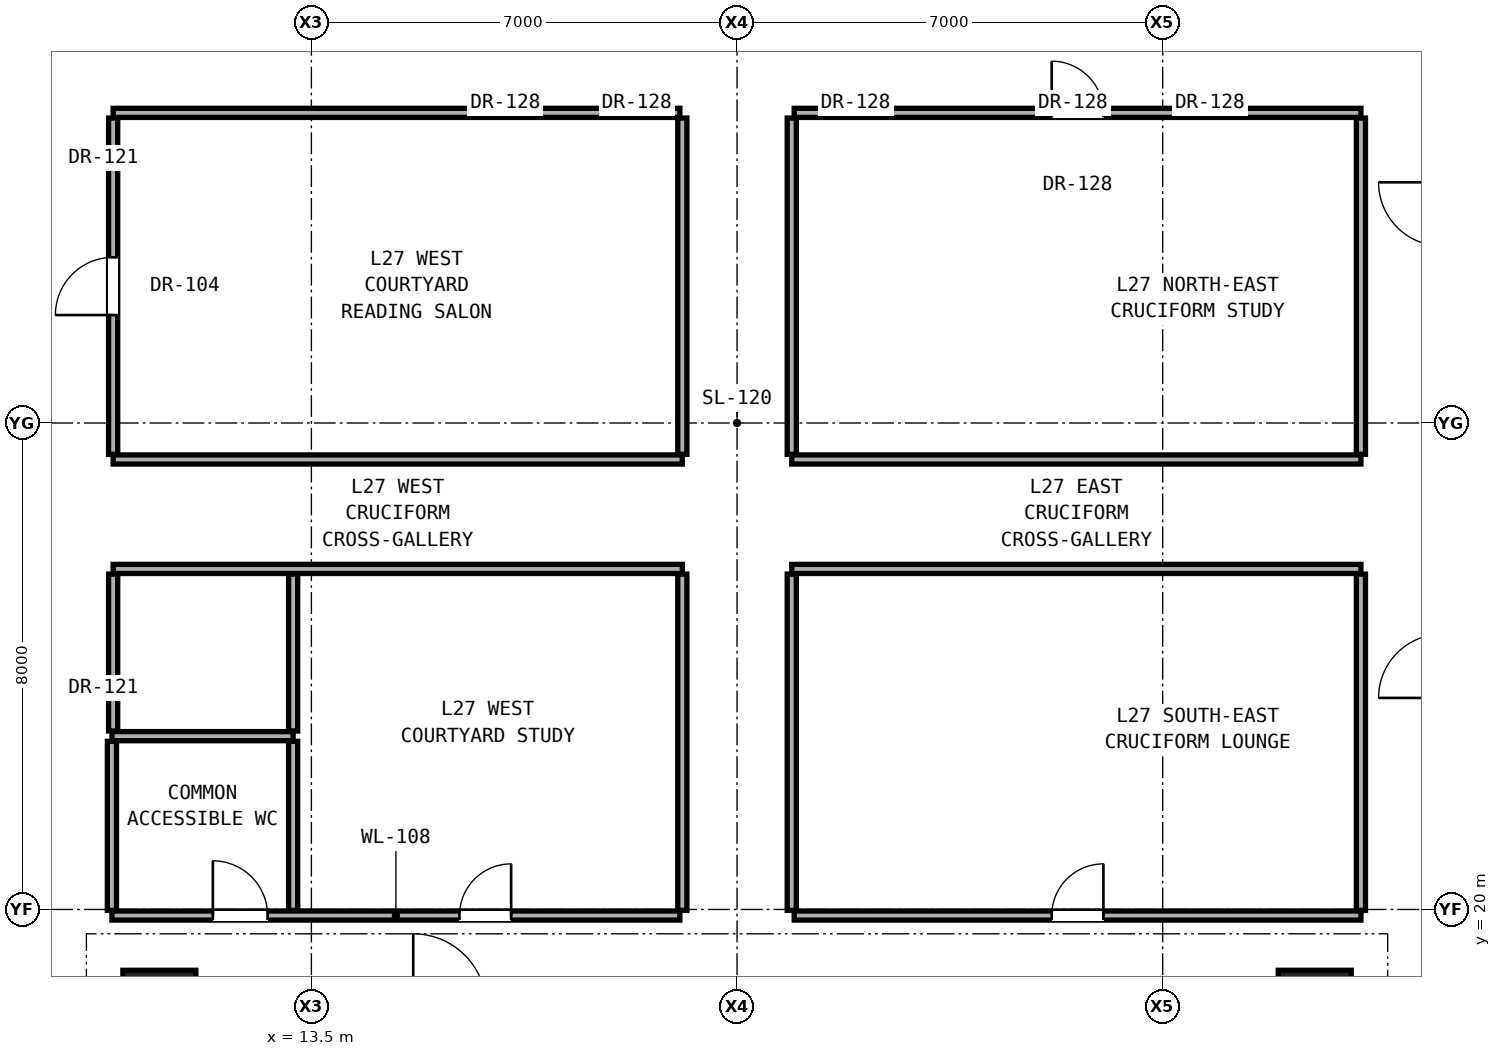
"""IFC4 building model, lengths in metres.
Left out: names, types, materials, properties, quantities, classifications, styles, units other than length and angle.
Written with IfcOpenShell. Run it as: python <this file> out.ifc"""

import sys

from ifc_helpers import new_model, si_unit, direction, frame, frame_2d, origin, origin_2d, place, context, subcontext, project, spatial, rectangle, extrude, element, fill, save


model = new_model("IFC4")
c1 = context("Model", 3, precision=1e-05, world=origin(), true_north=direction((0.0, 1.0)))
c2 = subcontext(c1, "Body", "Model", "MODEL_VIEW")
j1 = project(units=[si_unit("LENGTHUNIT", "METRE"), si_unit("PLANEANGLEUNIT", "RADIAN")], contexts=[c1])
p1 = place(None, origin())
s1 = spatial("IfcSite", under=j1, at=p1, CompositionType="ELEMENT")
p2 = place(p1, origin())
s2 = spatial("IfcBuilding", under=s1, at=p2, CompositionType="ELEMENT")
p3 = place(p2, frame((0.0, 0.0, 98.3)))
s3 = spatial("IfcBuildingStorey", under=s2, at=p3, CompositionType="ELEMENT", Elevation=98.3)
for number, where, z_axis, x_axis in (
    (1, (11.0, 18.4, 0.0), (0.0, 0.0, 1.0), (1.0, 0.0, 0.0)),
    (2, (30.0, 18.4, 0.0), (0.0, 0.0, 1.0), (1.0, 0.0, 0.0)),
):
    element("IfcColumn", number, at=place(p3, frame(where, z_axis=z_axis, x_axis=x_axis)), inside=s3, PredefinedType="COLUMN", context=c2, shape_type="SweptSolid", body=[
        extrude(rectangle(XDim=1.2, YDim=1.2, at=origin_2d()), origin(), (0.0, 0.0, 1.0), 3.3),
    ])
p4 = place(p3, frame((10.22, 19.9, 0.0), z_axis=(0.0, 0.0, 1.0), x_axis=(1.0, 0.0, 0.0)))
e3 = element("IfcWall", 3, at=p4, inside=s3, PredefinedType="PARTITIONING", context=c2, shape_type="SweptSolid", body=[
    extrude(rectangle(XDim=9.34, YDim=0.15, at=frame_2d((4.67, 0.0))), origin(), (0.0, 0.0, 1.0), 2.124),
])
p5 = place(p4, frame((1.66, 0.0, 0.0)))
e4 = element("IfcOpeningElement", 4, at=p5, cuts=e3, PredefinedType="OPENING", context=c2, shape_type="SweptSolid", body=[
    extrude(rectangle(XDim=0.9, YDim=2.1, at=frame_2d((0.45, 1.05))), frame((0.0, 0.085, 0.0), z_axis=(0.0, -1.0, 0.0), x_axis=(1.0, 0.0, 0.0)), (0.0, 0.0, 1.0), 0.17),
])
p6 = place(p4, frame((5.715, 0.0, 0.0)))
e5 = element("IfcOpeningElement", 5, at=p6, cuts=e3, PredefinedType="OPENING", context=c2, shape_type="SweptSolid", body=[
    extrude(rectangle(XDim=0.85, YDim=2.01, at=frame_2d((0.425, 1.005))), frame((0.0, 0.085, 0.0), z_axis=(0.0, -1.0, 0.0), x_axis=(1.0, 0.0, 0.0)), (0.0, 0.0, 1.0), 0.17),
])
p7 = place(p3, frame((21.44, 19.9, 0.0), z_axis=(0.0, 0.0, 1.0), x_axis=(1.0, 0.0, 0.0)))
e6 = element("IfcWall", 6, at=p7, inside=s3, PredefinedType="PARTITIONING", context=c2, shape_type="SweptSolid", body=[
    extrude(rectangle(XDim=9.32, YDim=0.15, at=frame_2d((4.66, 0.0))), origin(), (0.0, 0.0, 1.0), 2.124),
])
p8 = place(p7, frame((4.235, 0.0, 0.0)))
e7 = element("IfcOpeningElement", 7, at=p8, cuts=e6, PredefinedType="OPENING", context=c2, shape_type="SweptSolid", body=[
    extrude(rectangle(XDim=0.85, YDim=2.01, at=frame_2d((0.425, 1.005))), frame((0.0, 0.085, 0.0), z_axis=(0.0, -1.0, 0.0), x_axis=(1.0, 0.0, 0.0)), (0.0, 0.0, 1.0), 0.17),
])
p9 = place(p3, frame((10.22, 22.85, 0.0), z_axis=(0.0, 0.0, 1.0), x_axis=(1.0, 0.0, 0.0)))
e8 = element("IfcWall", 8, at=p9, inside=s3, PredefinedType="PARTITIONING", context=c2, shape_type="SweptSolid", body=[
    extrude(rectangle(XDim=2.98, YDim=0.15, at=frame_2d((1.49, 0.0))), origin(), (0.0, 0.0, 1.0), 2.124),
])
for number, where, z_axis, x_axis in (
    (9, (10.24, 25.6, 0.0), (0.0, 0.0, 1.0), (1.0, 0.0, 0.0)),
    (10, (21.4, 25.6, 0.0), (0.0, 0.0, 1.0), (1.0, 0.0, 0.0)),
    (11, (10.24, 27.4, 0.0), (0.0, 0.0, 1.0), (1.0, 0.0, 0.0)),
    (12, (21.4, 27.4, 0.0), (0.0, 0.0, 1.0), (1.0, 0.0, 0.0)),
):
    element("IfcWall", number, at=place(p3, frame(where, z_axis=z_axis, x_axis=x_axis)), inside=s3, PredefinedType="PARTITIONING", context=c2, shape_type="SweptSolid", body=[
        extrude(rectangle(XDim=9.36, YDim=0.15, at=frame_2d((4.68, 0.0))), origin(), (0.0, 0.0, 1.0), 2.124),
    ])
p10 = place(p3, frame((10.24, 33.1, 0.0), z_axis=(0.0, 0.0, 1.0), x_axis=(1.0, 0.0, 0.0)))
e13 = element("IfcWall", 13, at=p10, inside=s3, PredefinedType="PARTITIONING", context=c2, shape_type="SweptSolid", body=[
    extrude(rectangle(XDim=9.32, YDim=0.15, at=frame_2d((4.66, 0.0))), origin(), (0.0, 0.0, 1.0), 2.124),
])
p11 = place(p3, frame((21.44, 33.1, 0.0), z_axis=(0.0, 0.0, 1.0), x_axis=(1.0, 0.0, 0.0)))
e14 = element("IfcWall", 14, at=p11, inside=s3, PredefinedType="PARTITIONING", context=c2, shape_type="SweptSolid", body=[
    extrude(rectangle(XDim=9.32, YDim=0.15, at=frame_2d((4.66, 0.0))), origin(), (0.0, 0.0, 1.0), 2.124),
])
p12 = place(p11, frame((4.235, 0.0, 0.0)))
e15 = element("IfcOpeningElement", 15, at=p12, cuts=e14, PredefinedType="OPENING", context=c2, shape_type="SweptSolid", body=[
    extrude(rectangle(XDim=0.85, YDim=2.01, at=frame_2d((0.425, 1.005))), frame((0.0, 0.085, 0.0), z_axis=(0.0, -1.0, 0.0), x_axis=(1.0, 0.0, 0.0)), (0.0, 0.0, 1.0), 0.17),
])
p13 = place(p3, frame((10.22, 19.985, 0.0), z_axis=(0.0, 0.0, 1.0), x_axis=(0.0, 1.0, 0.0)))
e16 = element("IfcWall", 16, at=p13, inside=s3, PredefinedType="PARTITIONING", context=c2, shape_type="SweptSolid", body=[
    extrude(rectangle(XDim=2.78, YDim=0.15, at=frame_2d((1.39, 0.0))), origin(), (0.0, 0.0, 1.0), 3.08),
])
p14 = place(p3, frame((10.24, 22.935, 0.0), z_axis=(0.0, 0.0, 1.0), x_axis=(0.0, 1.0, 0.0)))
e17 = element("IfcWall", 17, at=p14, inside=s3, PredefinedType="PARTITIONING", context=c2, shape_type="SweptSolid", body=[
    extrude(rectangle(XDim=2.58, YDim=0.15, at=frame_2d((1.29, 0.0))), origin(), (0.0, 0.0, 1.0), 2.299),
])
p15 = place(p3, frame((10.24, 27.485, 0.0), z_axis=(0.0, 0.0, 1.0), x_axis=(0.0, 1.0, 0.0)))
e18 = element("IfcWall", 18, at=p15, inside=s3, PredefinedType="PARTITIONING", context=c2, shape_type="SweptSolid", body=[
    extrude(rectangle(XDim=5.53, YDim=0.15, at=frame_2d((2.765, 0.0))), origin(), (0.0, 0.0, 1.0), 2.299),
])
p16 = place(p15, frame((2.29, 0.0, 0.0)))
e19 = element("IfcOpeningElement", 19, at=p16, cuts=e18, PredefinedType="OPENING", context=c2, shape_type="SweptSolid", body=[
    extrude(rectangle(XDim=0.95, YDim=2.15, at=frame_2d((0.475, 1.075))), frame((0.0, 0.085, 0.0), z_axis=(0.0, -1.0, 0.0), x_axis=(1.0, 0.0, 0.0)), (0.0, 0.0, 1.0), 0.17),
])
p17 = place(p3, frame((13.2, 19.985, 0.0), z_axis=(0.0, 0.0, 1.0), x_axis=(0.0, 1.0, 0.0)))
e20 = element("IfcWall", 20, at=p17, inside=s3, PredefinedType="PARTITIONING", context=c2, shape_type="SweptSolid", body=[
    extrude(rectangle(XDim=2.78, YDim=0.15, at=frame_2d((1.39, 0.0))), origin(), (0.0, 0.0, 1.0), 3.08),
])
p18 = place(p3, frame((13.2, 22.935, 0.0), z_axis=(0.0, 0.0, 1.0), x_axis=(0.0, 1.0, 0.0)))
e21 = element("IfcWall", 21, at=p18, inside=s3, PredefinedType="PARTITIONING", context=c2, shape_type="SweptSolid", body=[
    extrude(rectangle(XDim=2.58, YDim=0.15, at=frame_2d((1.29, 0.0))), origin(), (0.0, 0.0, 1.0), 2.124),
])
for number, where, z_axis, x_axis in (
    (22, (19.6, 19.985, 0.0), (0.0, 0.0, 1.0), (0.0, 1.0, 0.0)),
    (23, (19.6, 27.485, 0.0), (0.0, 0.0, 1.0), (0.0, 1.0, 0.0)),
    (24, (21.4, 19.985, 0.0), (0.0, 0.0, 1.0), (0.0, 1.0, 0.0)),
    (25, (21.4, 27.485, 0.0), (0.0, 0.0, 1.0), (0.0, 1.0, 0.0)),
):
    element("IfcWall", number, at=place(p3, frame(where, z_axis=z_axis, x_axis=x_axis)), inside=s3, PredefinedType="PARTITIONING", context=c2, shape_type="SweptSolid", body=[
        extrude(rectangle(XDim=5.53, YDim=0.15, at=frame_2d((2.765, 0.0))), origin(), (0.0, 0.0, 1.0), 2.124),
    ])
for number, where, z_axis, x_axis in (
    (26, (30.76, 19.985, 0.0), (0.0, 0.0, 1.0), (0.0, 1.0, 0.0)),
    (27, (30.76, 27.485, 0.0), (0.0, 0.0, 1.0), (0.0, 1.0, 0.0)),
):
    element("IfcWall", number, at=place(p3, frame(where, z_axis=z_axis, x_axis=x_axis)), inside=s3, PredefinedType="PARTITIONING", context=c2, shape_type="SweptSolid", body=[
        extrude(rectangle(XDim=5.53, YDim=0.15, at=frame_2d((2.765, 0.0))), origin(), (0.0, 0.0, 1.0), 2.299),
    ])
p19 = place(p5, origin())
e28 = element("IfcDoor", 28, at=p19, inside=s3, OperationType="SINGLE_SWING_LEFT", PredefinedType="DOOR", context=c2, shape_type="SweptSolid", body=[
    extrude(rectangle(XDim=0.9, YDim=2.1, at=frame_2d((0.45, 1.05))), frame((0.0, 0.025, 0.0), z_axis=(0.0, -1.0, 0.0), x_axis=(1.0, 0.0, 0.0)), (0.0, 0.0, 1.0), 0.05),
])
fill(e4, e28)
p20 = place(p6, origin())
e29 = element("IfcDoor", 29, at=p20, inside=s3, OperationType="SINGLE_SWING_RIGHT", PredefinedType="DOOR", context=c2, shape_type="SweptSolid", body=[
    extrude(rectangle(XDim=0.85, YDim=2.01, at=frame_2d((0.425, 1.005))), frame((0.0, 0.025, 0.0), z_axis=(0.0, -1.0, 0.0), x_axis=(1.0, 0.0, 0.0)), (0.0, 0.0, 1.0), 0.05),
])
fill(e5, e29)
p21 = place(p16, origin())
e30 = element("IfcDoor", 30, at=p21, inside=s3, OperationType="SINGLE_SWING_LEFT", PredefinedType="DOOR", context=c2, shape_type="SweptSolid", body=[
    extrude(rectangle(XDim=0.95, YDim=2.15, at=frame_2d((0.475, 1.075))), frame((0.0, 0.025, 0.0), z_axis=(0.0, -1.0, 0.0), x_axis=(1.0, 0.0, 0.0)), (0.0, 0.0, 1.0), 0.05),
])
fill(e19, e30)
p22 = place(p8, origin())
e31 = element("IfcDoor", 31, at=p22, inside=s3, OperationType="SINGLE_SWING_RIGHT", PredefinedType="DOOR", context=c2, shape_type="SweptSolid", body=[
    extrude(rectangle(XDim=0.85, YDim=2.01, at=frame_2d((0.425, 1.005))), frame((0.0, 0.025, 0.0), z_axis=(0.0, -1.0, 0.0), x_axis=(1.0, 0.0, 0.0)), (0.0, 0.0, 1.0), 0.05),
])
fill(e7, e31)
p23 = place(p12, origin())
e32 = element("IfcDoor", 32, at=p23, inside=s3, OperationType="SINGLE_SWING_LEFT", PredefinedType="DOOR", context=c2, shape_type="SweptSolid", body=[
    extrude(rectangle(XDim=0.85, YDim=2.01, at=frame_2d((0.425, 1.005))), frame((0.0, 0.025, 0.0), z_axis=(0.0, -1.0, 0.0), x_axis=(1.0, 0.0, 0.0)), (0.0, 0.0, 1.0), 0.05),
])
fill(e15, e32)
save(model, sys.argv[1])
